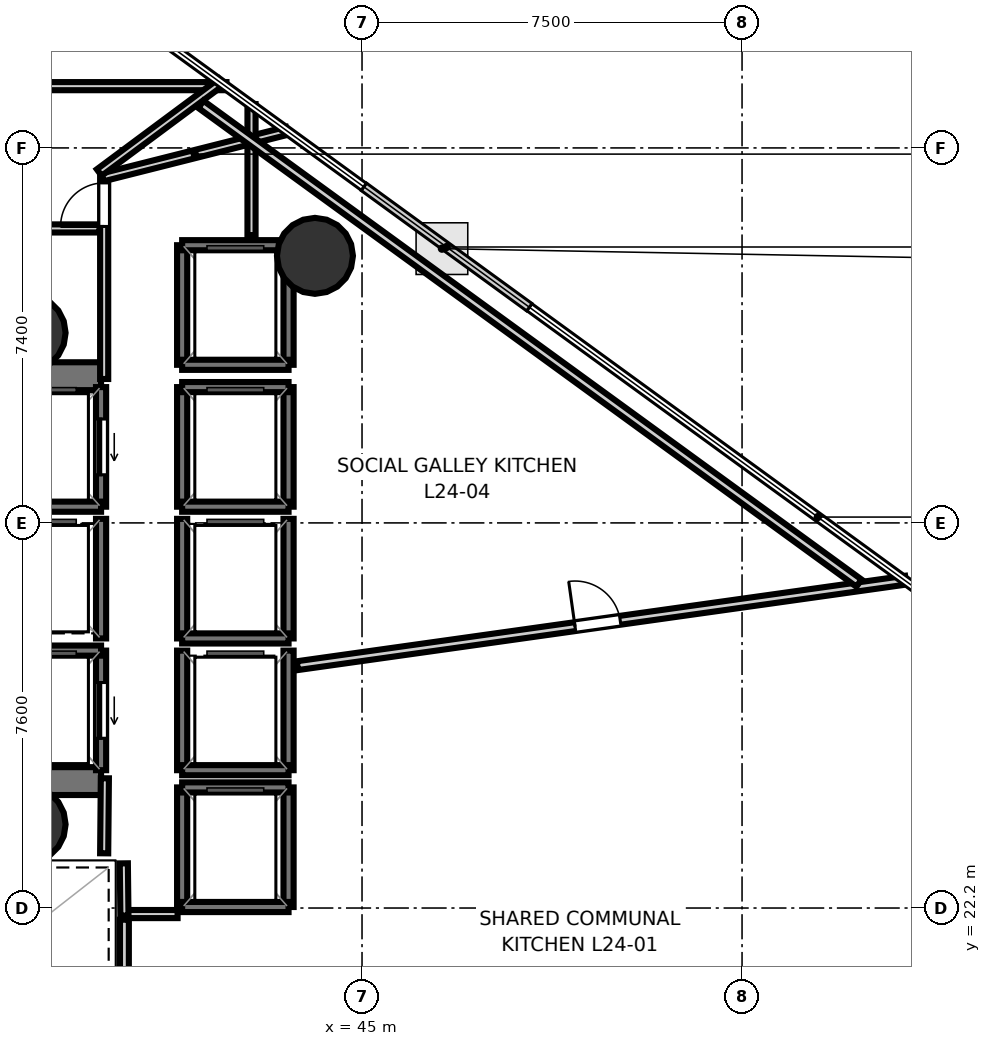
"""IFC4 building model, lengths in metres.
Left out: names, types, materials, properties, quantities, classifications, styles, units other than length and angle.
Written with IfcOpenShell. Run it as: python <this file> out.ifc"""

import sys

from ifc_helpers import new_model, si_unit, direction, frame, frame_2d, origin, origin_2d, place, context, subcontext, project, spatial, rectangle, hollow_circle, extrude, element, fill, save


model = new_model("IFC4")
c1 = context("Model", 3, precision=1e-05, world=origin(), true_north=direction((0.0, 1.0)))
c2 = subcontext(c1, "Body", "Model", "MODEL_VIEW")
j1 = project(units=[si_unit("LENGTHUNIT", "METRE"), si_unit("PLANEANGLEUNIT", "RADIAN")], contexts=[c1])
p1 = place(None, origin())
s1 = spatial("IfcSite", under=j1, at=p1, CompositionType="ELEMENT")
p2 = place(p1, origin())
s2 = spatial("IfcBuilding", under=s1, at=p2, CompositionType="ELEMENT")
p3 = place(p2, frame((0.0, 0.0, 97.8)))
s3 = spatial("IfcBuildingStorey", under=s2, at=p3, CompositionType="ELEMENT", Elevation=97.8)
p4 = place(p3, frame((29.23, 32.695, 0.0), z_axis=(0.0, 0.0, 1.0), x_axis=(1.0, 0.0, 0.0)))
e1 = element("IfcWall", 1, at=p4, inside=s3, PredefinedType="SHEAR", context=c2, shape_type="SweptSolid", body=[
    extrude(rectangle(XDim=10.62, YDim=0.55, at=frame_2d((5.31, 0.0))), origin(), (0.0, 0.0, 1.0), 3.52),
])
p5 = place(p4, frame((0.995, 0.0, 0.0)))
e2 = element("IfcOpeningElement", 2, at=p5, cuts=e1, PredefinedType="OPENING", context=c2, shape_type="SweptSolid", body=[
    extrude(rectangle(XDim=1.25, YDim=2.15, at=frame_2d((0.625, 1.075))), frame((0.0, 0.285, 0.0), z_axis=(0.0, -1.0, 0.0), x_axis=(1.0, 0.0, 0.0)), (0.0, 0.0, 1.0), 0.57),
])
p6 = place(p3, frame((29.23, 24.705, 0.0), z_axis=(0.0, 0.0, 1.0), x_axis=(1.0, 0.0, 0.0)))
e3 = element("IfcWall", 3, at=p6, inside=s3, PredefinedType="SHEAR", context=c2, shape_type="SweptSolid", body=[
    extrude(rectangle(XDim=10.62, YDim=0.55, at=frame_2d((5.31, 0.0))), origin(), (0.0, 0.0, 1.0), 3.52),
])
p7 = place(p6, frame((0.795, 0.0, 0.0)))
e4 = element("IfcOpeningElement", 4, at=p7, cuts=e3, PredefinedType="OPENING", context=c2, shape_type="SweptSolid", body=[
    extrude(rectangle(XDim=1.25, YDim=2.15, at=frame_2d((0.625, 1.075))), frame((0.0, 0.285, 0.0), z_axis=(0.0, -1.0, 0.0), x_axis=(1.0, 0.0, 0.0)), (0.0, 0.0, 1.0), 0.57),
])
for number, where, z_axis, x_axis in (
    (5, (38.4, 33.55, 0.0), (0.0, 0.0, 1.0), (1.0, 0.0, 0.0)),
    (6, (38.4, 23.85, 0.0), (0.0, 0.0, 1.0), (1.0, 0.0, 0.0)),
):
    element("IfcColumn", number, at=place(p3, frame(where, z_axis=z_axis, x_axis=x_axis)), inside=s3, PredefinedType="COLUMN", context=c2, shape_type="SweptSolid", body=[
        extrude(hollow_circle(Radius=0.75, WallThickness=0.036, at=origin_2d()), origin(), (0.0, 0.0, 1.0), 3.7),
    ])
p8 = place(p3, frame((44.071, 35.07, -0.23), z_axis=(0.0, 0.0, 1.0), x_axis=(1.0, 0.0, 0.0)))
e7 = element("IfcColumn", 7, at=p8, inside=s3, PredefinedType="COLUMN", context=c2, shape_type="SweptSolid", body=[
    extrude(hollow_circle(Radius=0.75, WallThickness=0.036, at=origin_2d()), origin(), (0.0, 0.0, 1.0), 3.93),
])
p9 = place(p3, frame((39.85, 30.12, 0.0), z_axis=(0.0, 0.0, 1.0), x_axis=(0.0, 1.0, 0.0)))
e8 = element("IfcWall", 8, at=p9, inside=s3, PredefinedType="SOLIDWALL", context=c2, shape_type="SweptSolid", body=[
    extrude(rectangle(XDim=2.36, YDim=0.2, at=frame_2d((1.18, 0.0))), origin(), (0.0, 0.0, 1.0), 3.52),
])
p10 = place(p9, frame((0.63, 0.0, 0.0)))
e9 = element("IfcOpeningElement", 9, at=p10, cuts=e8, PredefinedType="OPENING", context=c2, shape_type="SweptSolid", body=[
    extrude(rectangle(XDim=1.1, YDim=2.15, at=frame_2d((0.55, 1.075))), frame((0.0, 0.11, 0.0), z_axis=(0.0, -1.0, 0.0), x_axis=(1.0, 0.0, 0.0)), (0.0, 0.0, 1.0), 0.22),
])
p11 = place(p3, frame((37.75, 30.12, 0.0), z_axis=(0.0, 0.0, 1.0), x_axis=(1.0, 0.0, 0.0)))
e10 = element("IfcWall", 10, at=p11, inside=s3, PredefinedType="SOLIDWALL", context=c2, shape_type="SweptSolid", body=[
    extrude(rectangle(XDim=2.1, YDim=0.2, at=frame_2d((1.05, 0.0))), origin(), (0.0, 0.0, 1.0), 3.52),
])
p12 = place(p3, frame((39.85, 24.92, 0.0), z_axis=(0.0, 0.0, 1.0), x_axis=(0.0, 1.0, 0.0)))
e11 = element("IfcWall", 11, at=p12, inside=s3, PredefinedType="SOLIDWALL", context=c2, shape_type="SweptSolid", body=[
    extrude(rectangle(XDim=2.36, YDim=0.2, at=frame_2d((1.18, 0.0))), origin(), (0.0, 0.0, 1.0), 3.52),
])
p13 = place(p12, frame((0.63, 0.0, 0.0)))
e12 = element("IfcOpeningElement", 12, at=p13, cuts=e11, PredefinedType="OPENING", context=c2, shape_type="SweptSolid", body=[
    extrude(rectangle(XDim=1.1, YDim=2.15, at=frame_2d((0.55, 1.075))), frame((0.0, 0.11, 0.0), z_axis=(0.0, -1.0, 0.0), x_axis=(1.0, 0.0, 0.0)), (0.0, 0.0, 1.0), 0.22),
])
p14 = place(p3, frame((37.75, 27.28, 0.0), z_axis=(0.0, 0.0, 1.0), x_axis=(1.0, 0.0, 0.0)))
e13 = element("IfcWall", 13, at=p14, inside=s3, PredefinedType="SOLIDWALL", context=c2, shape_type="SweptSolid", body=[
    extrude(rectangle(XDim=2.1, YDim=0.2, at=frame_2d((1.05, 0.0))), origin(), (0.0, 0.0, 1.0), 3.52),
])
for number, where, z_axis, x_axis in (
    (14, (43.55, 30.12, 0.0), (0.0, 0.0, 1.0), (0.0, 1.0, 0.0)),
    (15, (41.45, 30.12, 0.0), (0.0, 0.0, 1.0), (0.0, 1.0, 0.0)),
):
    element("IfcWall", number, at=place(p3, frame(where, z_axis=z_axis, x_axis=x_axis)), inside=s3, PredefinedType="SOLIDWALL", context=c2, shape_type="SweptSolid", body=[
        extrude(rectangle(XDim=2.36, YDim=0.2, at=frame_2d((1.18, 0.0))), origin(), (0.0, 0.0, 1.0), 3.52),
    ])
for number, where, z_axis, x_axis in (
    (16, (41.45, 32.48, 0.0), (0.0, 0.0, 1.0), (1.0, 0.0, 0.0)),
    (17, (41.45, 30.12, 0.0), (0.0, 0.0, 1.0), (1.0, 0.0, 0.0)),
):
    element("IfcWall", number, at=place(p3, frame(where, z_axis=z_axis, x_axis=x_axis)), inside=s3, PredefinedType="SOLIDWALL", context=c2, shape_type="SweptSolid", body=[
        extrude(rectangle(XDim=2.1, YDim=0.2, at=frame_2d((1.05, 0.0))), origin(), (0.0, 0.0, 1.0), 3.52),
    ])
for number, where, z_axis, x_axis in (
    (18, (43.55, 27.52, 0.0), (0.0, 0.0, 1.0), (0.0, 1.0, 0.0)),
    (19, (41.45, 27.52, 0.0), (0.0, 0.0, 1.0), (0.0, 1.0, 0.0)),
):
    element("IfcWall", number, at=place(p3, frame(where, z_axis=z_axis, x_axis=x_axis)), inside=s3, PredefinedType="SOLIDWALL", context=c2, shape_type="SweptSolid", body=[
        extrude(rectangle(XDim=2.36, YDim=0.2, at=frame_2d((1.18, 0.0))), origin(), (0.0, 0.0, 1.0), 3.52),
    ])
p15 = place(p3, frame((41.45, 27.52, 0.0), z_axis=(0.0, 0.0, 1.0), x_axis=(1.0, 0.0, 0.0)))
e20 = element("IfcWall", 20, at=p15, inside=s3, PredefinedType="SOLIDWALL", context=c2, shape_type="SweptSolid", body=[
    extrude(rectangle(XDim=2.1, YDim=0.2, at=frame_2d((1.05, 0.0))), origin(), (0.0, 0.0, 1.0), 3.52),
])
for number, where, z_axis, x_axis in (
    (21, (43.55, 24.92, 0.0), (0.0, 0.0, 1.0), (0.0, 1.0, 0.0)),
    (22, (41.45, 24.92, 0.0), (0.0, 0.0, 1.0), (0.0, 1.0, 0.0)),
):
    element("IfcWall", number, at=place(p3, frame(where, z_axis=z_axis, x_axis=x_axis)), inside=s3, PredefinedType="SOLIDWALL", context=c2, shape_type="SweptSolid", body=[
        extrude(rectangle(XDim=2.36, YDim=0.2, at=frame_2d((1.18, 0.0))), origin(), (0.0, 0.0, 1.0), 3.52),
    ])
p16 = place(p3, frame((41.45, 24.92, 0.0), z_axis=(0.0, 0.0, 1.0), x_axis=(1.0, 0.0, 0.0)))
e23 = element("IfcWall", 23, at=p16, inside=s3, PredefinedType="SOLIDWALL", context=c2, shape_type="SweptSolid", body=[
    extrude(rectangle(XDim=2.1, YDim=0.2, at=frame_2d((1.05, 0.0))), origin(), (0.0, 0.0, 1.0), 3.52),
])
p17 = place(p3, frame((39.85, 27.52, 0.0), z_axis=(0.0, 0.0, 1.0), x_axis=(0.0, 1.0, 0.0)))
e24 = element("IfcWall", 24, at=p17, inside=s3, PredefinedType="SOLIDWALL", context=c2, shape_type="SweptSolid", body=[
    extrude(rectangle(XDim=2.36, YDim=0.2, at=frame_2d((1.18, 0.0))), origin(), (0.0, 0.0, 1.0), 3.52),
])
for number, where, z_axis, x_axis in (
    (25, (43.55, 22.22, 0.0), (0.0, 0.0, 1.0), (0.0, 1.0, 0.0)),
    (26, (41.45, 22.22, 0.0), (0.0, 0.0, 1.0), (0.0, 1.0, 0.0)),
):
    element("IfcWall", number, at=place(p3, frame(where, z_axis=z_axis, x_axis=x_axis)), inside=s3, PredefinedType="SOLIDWALL", context=c2, shape_type="SweptSolid", body=[
        extrude(rectangle(XDim=2.36, YDim=0.2, at=frame_2d((1.18, 0.0))), origin(), (0.0, 0.0, 1.0), 3.52),
    ])
for number, where, z_axis, x_axis in (
    (27, (41.45, 24.58, 0.0), (0.0, 0.0, 1.0), (1.0, 0.0, 0.0)),
    (28, (41.45, 22.22, 0.0), (0.0, 0.0, 1.0), (1.0, 0.0, 0.0)),
):
    element("IfcWall", number, at=place(p3, frame(where, z_axis=z_axis, x_axis=x_axis)), inside=s3, PredefinedType="SOLIDWALL", context=c2, shape_type="SweptSolid", body=[
        extrude(rectangle(XDim=2.1, YDim=0.2, at=frame_2d((1.05, 0.0))), origin(), (0.0, 0.0, 1.0), 3.52),
    ])
for number, where, z_axis, x_axis in (
    (29, (43.55, 32.92, 0.0), (0.0, 0.0, 1.0), (0.0, 1.0, 0.0)),
    (30, (41.45, 32.92, 0.0), (0.0, 0.0, 1.0), (0.0, 1.0, 0.0)),
):
    element("IfcWall", number, at=place(p3, frame(where, z_axis=z_axis, x_axis=x_axis)), inside=s3, PredefinedType="SOLIDWALL", context=c2, shape_type="SweptSolid", body=[
        extrude(rectangle(XDim=2.36, YDim=0.2, at=frame_2d((1.18, 0.0))), origin(), (0.0, 0.0, 1.0), 3.52),
    ])
for number, where, z_axis, x_axis in (
    (31, (41.45, 35.28, 0.0), (0.0, 0.0, 1.0), (1.0, 0.0, 0.0)),
    (32, (41.45, 32.92, 0.0), (0.0, 0.0, 1.0), (1.0, 0.0, 0.0)),
):
    element("IfcWall", number, at=place(p3, frame(where, z_axis=z_axis, x_axis=x_axis)), inside=s3, PredefinedType="SOLIDWALL", context=c2, shape_type="SweptSolid", body=[
        extrude(rectangle(XDim=2.1, YDim=0.2, at=frame_2d((1.05, 0.0))), origin(), (0.0, 0.0, 1.0), 3.52),
    ])
p18 = place(p3, frame((39.911, 32.64, 0.0), z_axis=(0.0, 0.0, 1.0), x_axis=(0.0, 1.0, 0.0)))
e33 = element("IfcWall", 33, at=p18, inside=s3, PredefinedType="PARTITIONING", context=c2, shape_type="SweptSolid", body=[
    extrude(rectangle(XDim=4.01, YDim=0.16, at=frame_2d((2.005, 0.0))), origin(), (0.0, 0.0, 1.0), 2.84),
])
p19 = place(p18, frame((3.01, 0.0, 0.0)))
e34 = element("IfcOpeningElement", 34, at=p19, cuts=e33, PredefinedType="OPENING", context=c2, shape_type="SweptSolid", body=[
    extrude(rectangle(XDim=0.86, YDim=2.05, at=frame_2d((0.43, 1.025))), frame((0.0, 0.09, 0.0), z_axis=(0.0, -1.0, 0.0), x_axis=(1.0, 0.0, 0.0)), (0.0, 0.0, 1.0), 0.18),
])
p20 = place(p3, frame((39.88, 36.619, 0.0), z_axis=(0.0, 0.0, 1.0), x_axis=(0.969604227455, 0.244678650687, 0.0)))
e35 = element("IfcWall", 35, at=p20, inside=s3, PredefinedType="PARTITIONING", context=c2, shape_type="SweptSolid", body=[
    extrude(rectangle(XDim=3.752, YDim=0.16, at=frame_2d((1.876, 0.0))), origin(), (0.0, 0.0, 1.0), 2.84),
])
p21 = place(p3, frame((42.819, 38.065, 0.0), z_axis=(0.0, 0.0, 1.0), x_axis=(0.0, -1.0, 0.0)))
e36 = element("IfcWall", 36, at=p21, inside=s3, PredefinedType="PARTITIONING", context=c2, shape_type="SweptSolid", body=[
    extrude(rectangle(XDim=2.585, YDim=0.16, at=frame_2d((1.292, 0.0))), origin(), (0.0, 0.0, 1.0), 2.84),
])
p22 = place(p3, frame((41.36, 22.081, 0.0), z_axis=(0.0, 0.0, 1.0), x_axis=(-1.0, 0.0, 0.0)))
e37 = element("IfcWall", 37, at=p22, inside=s3, PredefinedType="PARTITIONING", context=c2, shape_type="SweptSolid", body=[
    extrude(rectangle(XDim=1.08, YDim=0.16, at=frame_2d((0.54, 0.0))), origin(), (0.0, 0.0, 1.0), 2.84),
])
p23 = place(p3, frame((40.311, 22.05, 0.0), z_axis=(0.0, 0.0, 1.0), x_axis=(-0.011836292006, 0.999929948642, 0.0)))
e38 = element("IfcWall", 38, at=p23, inside=s3, PredefinedType="PARTITIONING", context=c2, shape_type="SweptSolid", body=[
    extrude(rectangle(XDim=1.031, YDim=0.16, at=frame_2d((0.516, 0.0))), origin(), (0.0, 0.0, 1.0), 2.84),
])
p24 = place(p3, frame((39.911, 23.28, 0.0), z_axis=(0.0, 0.0, 1.0), x_axis=(0.009397771291, 0.999955839972, 0.0)))
e39 = element("IfcWall", 39, at=p24, inside=s3, PredefinedType="PARTITIONING", context=c2, shape_type="SweptSolid", body=[
    extrude(rectangle(XDim=1.481, YDim=0.16, at=frame_2d((0.74, 0.0))), origin(), (0.0, 0.0, 1.0), 2.84),
])
p25 = place(p3, frame((26.42, 38.419, 0.0), z_axis=(0.0, 0.0, 1.0), x_axis=(1.0, 0.0, 0.0)))
e40 = element("IfcWall", 40, at=p25, inside=s3, PredefinedType="PARTITIONING", context=c2, shape_type="SweptSolid", body=[
    extrude(rectangle(XDim=15.905, YDim=0.16, at=frame_2d((7.953, 0.0))), origin(), (0.0, 0.0, 1.0), 2.84),
])
p26 = place(p25, frame((7.323, 0.0, 0.0)))
e41 = element("IfcOpeningElement", 41, at=p26, cuts=e40, PredefinedType="OPENING", context=c2, shape_type="SweptSolid", body=[
    extrude(rectangle(XDim=0.9, YDim=2.1, at=frame_2d((0.45, 1.05))), frame((0.0, 0.09, 0.0), z_axis=(0.0, -1.0, 0.0), x_axis=(1.0, 0.0, 0.0)), (0.0, 0.0, 1.0), 0.18),
])
p27 = place(p3, frame((42.222, 38.503, 0.0), z_axis=(0.0, 0.0, 1.0), x_axis=(-0.80276499598, -0.596295531787, 0.0)))
e42 = element("IfcWall", 42, at=p27, inside=s3, PredefinedType="PARTITIONING", context=c2, shape_type="SweptSolid", body=[
    extrude(rectangle(XDim=3.0, YDim=0.16, at=frame_2d((1.5, 0.0))), origin(), (0.0, 0.0, 1.0), 2.84),
])
p28 = place(p3, frame((39.818, 35.611, 0.0), z_axis=(0.0, 0.0, 1.0), x_axis=(-1.0, 0.0, 0.0)))
e43 = element("IfcWall", 43, at=p28, inside=s3, PredefinedType="PARTITIONING", context=c2, shape_type="SweptSolid", body=[
    extrude(rectangle(XDim=2.968, YDim=0.16, at=frame_2d((1.484, 0.0))), origin(), (0.0, 0.0, 1.0), 2.84),
])
p29 = place(p3, frame((40.31, 17.972, 0.0), z_axis=(0.0, 0.0, 1.0), x_axis=(0.000305362145, 0.999999953377, 0.0)))
e44 = element("IfcWall", 44, at=p29, inside=s3, PredefinedType="PLUMBINGWALL", context=c2, shape_type="SweptSolid", body=[
    extrude(rectangle(XDim=3.998, YDim=0.175, at=frame_2d((1.999, 0.0))), origin(), (0.0, 0.0, 1.0), 2.84),
])
p30 = place(p3, frame((43.724, 26.983, 0.0), z_axis=(0.0, 0.0, 1.0), x_axis=(0.990269113944, 0.139165663755, 0.0)))
e45 = element("IfcWall", 45, at=p30, inside=s3, PredefinedType="PLUMBINGWALL", context=c2, shape_type="SweptSolid", body=[
    extrude(rectangle(XDim=12.124, YDim=0.175, at=frame_2d((6.062, 0.0))), origin(), (0.0, 0.0, 1.0), 2.84),
])
p31 = place(p30, frame((5.534, 0.0, 0.0)))
e46 = element("IfcOpeningElement", 46, at=p31, cuts=e45, PredefinedType="OPENING", context=c2, shape_type="SweptSolid", body=[
    extrude(rectangle(XDim=0.9, YDim=2.1, at=frame_2d((0.45, 1.05))), frame((0.0, 0.097, 0.0), z_axis=(0.0, -1.0, 0.0), x_axis=(1.0, 0.0, 0.0)), (0.0, 0.0, 1.0), 0.195),
])
p32 = place(p3, frame((41.82, 38.059, 0.0), z_axis=(0.0, 0.0, 1.0), x_axis=(0.808676260011, -0.588253947284, 0.0)))
e47 = element("IfcWall", 47, at=p32, inside=s3, PredefinedType="PLUMBINGWALL", context=c2, shape_type="SweptSolid", body=[
    extrude(rectangle(XDim=16.06, YDim=0.175, at=frame_2d((8.03, 0.0))), origin(), (0.0, 0.0, 1.0), 2.84),
])
p33 = place(p10, origin())
e48 = element("IfcDoor", 48, at=p33, inside=s3, OperationType="SLIDING_TO_LEFT", PredefinedType="DOOR", context=c2, shape_type="SweptSolid", body=[
    extrude(rectangle(XDim=1.1, YDim=2.15, at=frame_2d((0.55, 1.075))), frame((0.0, 0.025, 0.0), z_axis=(0.0, -1.0, 0.0), x_axis=(1.0, 0.0, 0.0)), (0.0, 0.0, 1.0), 0.05),
])
fill(e9, e48)
p34 = place(p13, origin())
e49 = element("IfcDoor", 49, at=p34, inside=s3, OperationType="SLIDING_TO_LEFT", PredefinedType="DOOR", context=c2, shape_type="SweptSolid", body=[
    extrude(rectangle(XDim=1.1, YDim=2.15, at=frame_2d((0.55, 1.075))), frame((0.0, 0.025, 0.0), z_axis=(0.0, -1.0, 0.0), x_axis=(1.0, 0.0, 0.0)), (0.0, 0.0, 1.0), 0.05),
])
fill(e12, e49)
p35 = place(p19, origin())
e50 = element("IfcDoor", 50, at=p35, inside=s3, OperationType="SINGLE_SWING_LEFT", PredefinedType="DOOR", context=c2, shape_type="SweptSolid", body=[
    extrude(rectangle(XDim=0.86, YDim=2.05, at=frame_2d((0.43, 1.025))), frame((0.0, 0.025, 0.0), z_axis=(0.0, -1.0, 0.0), x_axis=(1.0, 0.0, 0.0)), (0.0, 0.0, 1.0), 0.05),
])
fill(e34, e50)
p36 = place(p31, origin())
e51 = element("IfcDoor", 51, at=p36, inside=s3, OperationType="SINGLE_SWING_LEFT", PredefinedType="DOOR", context=c2, shape_type="SweptSolid", body=[
    extrude(rectangle(XDim=0.9, YDim=2.1, at=frame_2d((0.45, 1.05))), frame((0.0, 0.025, 0.0), z_axis=(0.0, -1.0, 0.0), x_axis=(1.0, 0.0, 0.0)), (0.0, 0.0, 1.0), 0.05),
])
fill(e46, e51)
save(model, sys.argv[1])
